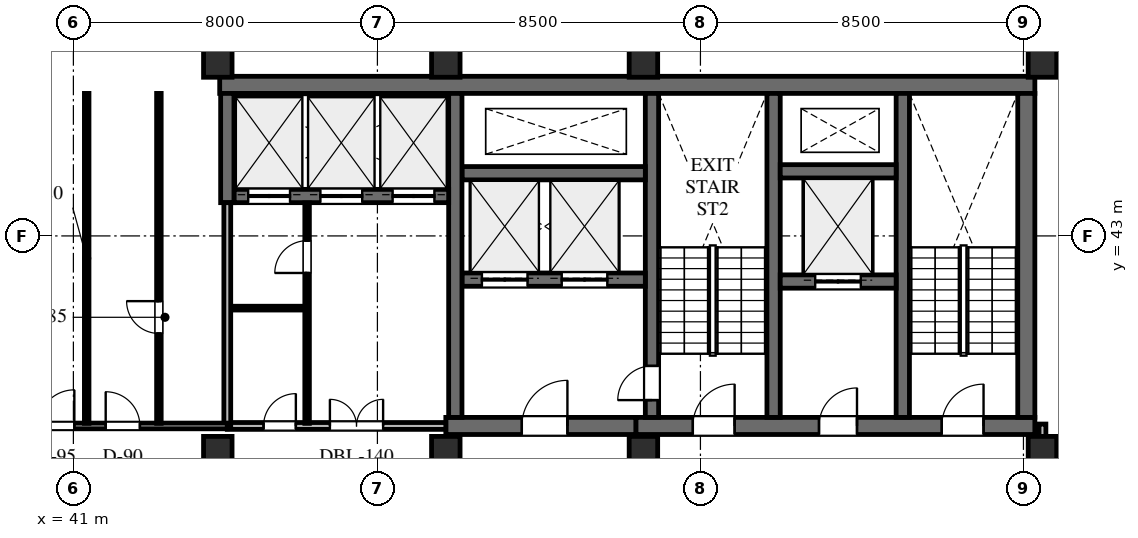
"""IFC4 building model, lengths in metres.
Left out: names, types, materials, properties, quantities, classifications, styles, units other than length and angle.
Written with IfcOpenShell. Run it as: python <this file> out.ifc"""

import sys

from ifc_helpers import new_model, si_unit, direction, frame, frame_2d, origin, origin_2d, place, context, subcontext, project, spatial, rectangle, extrude, element, fill, save


model = new_model("IFC4")
c1 = context("Model", 3, precision=1e-05, world=origin(), true_north=direction((0.0, 1.0)))
c2 = subcontext(c1, "Body", "Model", "MODEL_VIEW")
j1 = project(units=[si_unit("LENGTHUNIT", "METRE"), si_unit("PLANEANGLEUNIT", "RADIAN")], contexts=[c1])
p1 = place(None, origin())
s1 = spatial("IfcSite", under=j1, at=p1, CompositionType="ELEMENT")
p2 = place(p1, origin())
s2 = spatial("IfcBuilding", under=s1, at=p2, CompositionType="ELEMENT")
p3 = place(p2, frame((0.0, 0.0, 303.9)))
s3 = spatial("IfcBuildingStorey", under=s2, at=p3, CompositionType="ELEMENT", Elevation=303.9)
p4 = place(p3, frame((44.85, 46.975, 0.0), z_axis=(0.0, 0.0, 1.0), x_axis=(1.0, 0.0, 0.0)))
e1 = element("IfcWall", 1, at=p4, inside=s3, PredefinedType="SHEAR", context=c2, shape_type="SweptSolid", body=[
    extrude(rectangle(XDim=21.45, YDim=0.45, at=frame_2d((10.725, 0.0))), origin(), (0.0, 0.0, 1.0), 3.6),
])
p5 = place(p3, frame((55.8, 38.0, 0.0), z_axis=(0.0, 0.0, 1.0), x_axis=(1.0, 0.0, 0.0)))
e2 = element("IfcWall", 2, at=p5, inside=s3, PredefinedType="SHEAR", context=c2, shape_type="SweptSolid", body=[
    extrude(rectangle(XDim=10.5, YDim=0.45, at=frame_2d((5.25, 0.0))), origin(), (0.0, 0.0, 1.0), 3.6),
])
p6 = place(p5, frame((1.5, 0.0, 0.0)))
e3 = element("IfcOpeningElement", 3, at=p6, cuts=e2, PredefinedType="OPENING", context=c2, shape_type="SweptSolid", body=[
    extrude(rectangle(XDim=1.1, YDim=2.2, at=frame_2d((0.55, 1.1))), frame((0.0, 0.235, 0.0), z_axis=(0.0, -1.0, 0.0), x_axis=(1.0, 0.0, 0.0)), (0.0, 0.0, 1.0), 0.47),
])
p7 = place(p5, frame((4.82, 0.0, 0.0)))
e4 = element("IfcOpeningElement", 4, at=p7, cuts=e2, PredefinedType="OPENING", context=c2, shape_type="SweptSolid", body=[
    extrude(rectangle(XDim=1.0, YDim=2.15, at=frame_2d((0.5, 1.075))), frame((0.0, 0.235, 0.0), z_axis=(0.0, -1.0, 0.0), x_axis=(1.0, 0.0, 0.0)), (0.0, 0.0, 1.0), 0.47),
])
p8 = place(p5, frame((8.05, 0.0, 0.0)))
e5 = element("IfcOpeningElement", 5, at=p8, cuts=e2, PredefinedType="OPENING", context=c2, shape_type="SweptSolid", body=[
    extrude(rectangle(XDim=1.1, YDim=2.2, at=frame_2d((0.55, 1.1))), frame((0.0, 0.235, 0.0), z_axis=(0.0, -1.0, 0.0), x_axis=(1.0, 0.0, 0.0)), (0.0, 0.0, 1.0), 0.47),
])
p9 = place(p3, frame((66.075, 38.225, 0.0), z_axis=(0.0, 0.0, 1.0), x_axis=(0.0, 1.0, 0.0)))
e6 = element("IfcWall", 6, at=p9, inside=s3, PredefinedType="SHEAR", context=c2, shape_type="SweptSolid", body=[
    extrude(rectangle(XDim=8.525, YDim=0.45, at=frame_2d((4.262, 0.0))), origin(), (0.0, 0.0, 1.0), 3.6),
])
for number, where, z_axis, x_axis in (
    (7, (62.825, 38.225, 0.0), (0.0, 0.0, 1.0), (0.0, 1.0, 0.0)),
    (8, (59.425, 38.225, 0.0), (0.0, 0.0, 1.0), (0.0, 1.0, 0.0)),
):
    element("IfcWall", number, at=place(p3, frame(where, z_axis=z_axis, x_axis=x_axis)), inside=s3, PredefinedType="SHEAR", context=c2, shape_type="SweptSolid", body=[
        extrude(rectangle(XDim=8.525, YDim=0.35, at=frame_2d((4.262, 0.0))), origin(), (0.0, 0.0, 1.0), 3.6),
    ])
p10 = place(p3, frame((56.225, 38.225, 0.0), z_axis=(0.0, 0.0, 1.0), x_axis=(0.0, 1.0, 0.0)))
e9 = element("IfcWall", 9, at=p10, inside=s3, PredefinedType="SHEAR", context=c2, shape_type="SweptSolid", body=[
    extrude(rectangle(XDim=8.525, YDim=0.35, at=frame_2d((4.262, 0.0))), origin(), (0.0, 0.0, 1.0), 3.6),
])
p11 = place(p10, frame((0.455, 0.0, 0.0)))
e10 = element("IfcOpeningElement", 10, at=p11, cuts=e9, PredefinedType="OPENING", context=c2, shape_type="SweptSolid", body=[
    extrude(rectangle(XDim=0.9, YDim=2.15, at=frame_2d((0.45, 1.075))), frame((0.0, 0.185, 0.0), z_axis=(0.0, -1.0, 0.0), x_axis=(1.0, 0.0, 0.0)), (0.0, 0.0, 1.0), 0.37),
])
p12 = place(p3, frame((59.6, 41.8, 0.0), z_axis=(0.0, 0.0, 1.0), x_axis=(1.0, 0.0, 0.0)))
e11 = element("IfcWall", 11, at=p12, inside=s3, PredefinedType="SHEAR", context=c2, shape_type="SweptSolid", body=[
    extrude(rectangle(XDim=3.05, YDim=0.35, at=frame_2d((1.525, 0.0))), origin(), (0.0, 0.0, 1.0), 3.6),
])
p13 = place(p12, frame((0.92, 0.0, 0.0)))
e12 = element("IfcOpeningElement", 12, at=p13, cuts=e11, PredefinedType="OPENING", context=c2, shape_type="SweptSolid", body=[
    extrude(rectangle(XDim=1.2, YDim=2.2, at=frame_2d((0.6, 1.1))), frame((0.0, 0.185, 0.0), z_axis=(0.0, -1.0, 0.0), x_axis=(1.0, 0.0, 0.0)), (0.0, 0.0, 1.0), 0.37),
])
p14 = place(p3, frame((59.6, 44.7, 0.0), z_axis=(0.0, 0.0, 1.0), x_axis=(1.0, 0.0, 0.0)))
e13 = element("IfcWall", 13, at=p14, inside=s3, PredefinedType="SHEAR", context=c2, shape_type="SweptSolid", body=[
    extrude(rectangle(XDim=3.05, YDim=0.35, at=frame_2d((1.525, 0.0))), origin(), (0.0, 0.0, 1.0), 3.6),
])
p15 = place(p3, frame((50.8, 38.0, 0.0), z_axis=(0.0, 0.0, 1.0), x_axis=(1.0, 0.0, 0.0)))
e14 = element("IfcWall", 14, at=p15, inside=s3, PredefinedType="SHEAR", context=c2, shape_type="SweptSolid", body=[
    extrude(rectangle(XDim=5.0, YDim=0.45, at=frame_2d((2.5, 0.0))), origin(), (0.0, 0.0, 1.0), 3.6),
])
p16 = place(p15, frame((2.0, 0.0, 0.0)))
e15 = element("IfcOpeningElement", 15, at=p16, cuts=e14, PredefinedType="OPENING", context=c2, shape_type="SweptSolid", body=[
    extrude(rectangle(XDim=1.2, YDim=2.2, at=frame_2d((0.6, 1.1))), frame((0.0, 0.235, 0.0), z_axis=(0.0, -1.0, 0.0), x_axis=(1.0, 0.0, 0.0)), (0.0, 0.0, 1.0), 0.47),
])
p17 = place(p3, frame((51.225, 41.85, 0.0), z_axis=(0.0, 0.0, 1.0), x_axis=(1.0, 0.0, 0.0)))
e16 = element("IfcWall", 16, at=p17, inside=s3, PredefinedType="SHEAR", context=c2, shape_type="SweptSolid", body=[
    extrude(rectangle(XDim=4.825, YDim=0.35, at=frame_2d((2.413, 0.0))), origin(), (0.0, 0.0, 1.0), 3.6),
])
p18 = place(p17, frame((0.525, 0.0, 0.0)))
e17 = element("IfcOpeningElement", 17, at=p18, cuts=e16, PredefinedType="OPENING", context=c2, shape_type="SweptSolid", body=[
    extrude(rectangle(XDim=1.2, YDim=2.2, at=frame_2d((0.6, 1.1))), frame((0.0, 0.185, 0.0), z_axis=(0.0, -1.0, 0.0), x_axis=(1.0, 0.0, 0.0)), (0.0, 0.0, 1.0), 0.37),
])
p19 = place(p17, frame((2.625, 0.0, 0.0)))
e18 = element("IfcOpeningElement", 18, at=p19, cuts=e16, PredefinedType="OPENING", context=c2, shape_type="SweptSolid", body=[
    extrude(rectangle(XDim=1.2, YDim=2.2, at=frame_2d((0.6, 1.1))), frame((0.0, 0.185, 0.0), z_axis=(0.0, -1.0, 0.0), x_axis=(1.0, 0.0, 0.0)), (0.0, 0.0, 1.0), 0.37),
])
p20 = place(p3, frame((51.225, 44.65, 0.0), z_axis=(0.0, 0.0, 1.0), x_axis=(1.0, 0.0, 0.0)))
e19 = element("IfcWall", 19, at=p20, inside=s3, PredefinedType="SHEAR", context=c2, shape_type="SweptSolid", body=[
    extrude(rectangle(XDim=4.825, YDim=0.35, at=frame_2d((2.413, 0.0))), origin(), (0.0, 0.0, 1.0), 3.6),
])
p21 = place(p3, frame((51.05, 38.225, 0.0), z_axis=(0.0, 0.0, 1.0), x_axis=(0.0, 1.0, 0.0)))
e20 = element("IfcWall", 20, at=p21, inside=s3, PredefinedType="SHEAR", context=c2, shape_type="SweptSolid", body=[
    extrude(rectangle(XDim=8.525, YDim=0.35, at=frame_2d((4.262, 0.0))), origin(), (0.0, 0.0, 1.0), 3.6),
])
p22 = place(p3, frame((45.225, 44.05, 0.0), z_axis=(0.0, 0.0, 1.0), x_axis=(1.0, 0.0, 0.0)))
e21 = element("IfcWall", 21, at=p22, inside=s3, PredefinedType="SHEAR", context=c2, shape_type="SweptSolid", body=[
    extrude(rectangle(XDim=5.65, YDim=0.35, at=frame_2d((2.825, 0.0))), origin(), (0.0, 0.0, 1.0), 3.6),
])
p23 = place(p22, frame((0.375, 0.0, 0.0)))
e22 = element("IfcOpeningElement", 22, at=p23, cuts=e21, PredefinedType="OPENING", context=c2, shape_type="SweptSolid", body=[
    extrude(rectangle(XDim=1.1, YDim=2.2, at=frame_2d((0.55, 1.1))), frame((0.0, 0.185, 0.0), z_axis=(0.0, -1.0, 0.0), x_axis=(1.0, 0.0, 0.0)), (0.0, 0.0, 1.0), 0.37),
])
p24 = place(p22, frame((2.275, 0.0, 0.0)))
e23 = element("IfcOpeningElement", 23, at=p24, cuts=e21, PredefinedType="OPENING", context=c2, shape_type="SweptSolid", body=[
    extrude(rectangle(XDim=1.1, YDim=2.2, at=frame_2d((0.55, 1.1))), frame((0.0, 0.185, 0.0), z_axis=(0.0, -1.0, 0.0), x_axis=(1.0, 0.0, 0.0)), (0.0, 0.0, 1.0), 0.37),
])
p25 = place(p22, frame((4.175, 0.0, 0.0)))
e24 = element("IfcOpeningElement", 24, at=p25, cuts=e21, PredefinedType="OPENING", context=c2, shape_type="SweptSolid", body=[
    extrude(rectangle(XDim=1.1, YDim=2.2, at=frame_2d((0.55, 1.1))), frame((0.0, 0.185, 0.0), z_axis=(0.0, -1.0, 0.0), x_axis=(1.0, 0.0, 0.0)), (0.0, 0.0, 1.0), 0.37),
])
p26 = place(p3, frame((45.05, 43.875, 0.0), z_axis=(0.0, 0.0, 1.0), x_axis=(0.0, 1.0, 0.0)))
e25 = element("IfcWall", 25, at=p26, inside=s3, PredefinedType="SHEAR", context=c2, shape_type="SweptSolid", body=[
    extrude(rectangle(XDim=2.875, YDim=0.35, at=frame_2d((1.438, 0.0))), origin(), (0.0, 0.0, 1.0), 3.6),
])
for number, where, z_axis, x_axis in (
    (26, (66.5, 47.55, 0.0), (0.0, 0.0, 1.0), (1.0, 0.0, 0.0)),
    (27, (56.0, 47.55, 0.0), (0.0, 0.0, 1.0), (1.0, 0.0, 0.0)),
    (28, (66.5, 37.35, 0.0), (0.0, 0.0, 1.0), (1.0, 0.0, 0.0)),
    (29, (56.0, 37.35, 0.0), (0.0, 0.0, 1.0), (1.0, 0.0, 0.0)),
    (30, (50.8, 47.55, 0.0), (0.0, 0.0, 1.0), (1.0, 0.0, 0.0)),
    (31, (50.8, 37.35, 0.0), (0.0, 0.0, 1.0), (1.0, 0.0, 0.0)),
    (32, (44.8, 37.35, 0.0), (0.0, 0.0, 1.0), (1.0, 0.0, 0.0)),
    (33, (44.8, 47.55, 0.0), (0.0, 0.0, 1.0), (1.0, 0.0, 0.0)),
):
    element("IfcColumn", number, at=place(p3, frame(where, z_axis=z_axis, x_axis=x_axis)), inside=s3, PredefinedType="COLUMN", context=c2, shape_type="SweptSolid", body=[
        extrude(rectangle(XDim=0.75, YDim=0.75, at=origin_2d()), origin(), (0.0, 0.0, 1.0), 3.6),
    ])
p27 = place(p3, frame((68.375, 37.8, 0.0), z_axis=(0.0, 0.0, 1.0), x_axis=(-0.139177573889, -0.990267440102, 0.0)))
e34 = element("IfcWall", 34, at=p27, inside=s3, PredefinedType="STANDARD", context=c2, shape_type="SweptSolid", body=[
    extrude(rectangle(XDim=16.317, YDim=0.28, at=frame_2d((8.159, 0.0))), origin(), (0.0, 0.0, 1.0), 3.365),
])
p28 = place(p27, frame((8.319, 0.0, 0.0)))
e35 = element("IfcOpeningElement", 35, at=p28, cuts=e34, PredefinedType="OPENING", context=c2, shape_type="SweptSolid", body=[
    extrude(rectangle(XDim=1.0, YDim=2.15, at=frame_2d((0.5, 1.075))), frame((0.0, 0.15, 0.0), z_axis=(0.0, -1.0, 0.0), x_axis=(1.0, 0.0, 0.0)), (0.0, 0.0, 1.0), 0.3),
])
p29 = place(p27, frame((3.754, 0.0, 0.65)))
e36 = element("IfcOpeningElement", 36, at=p29, cuts=e34, PredefinedType="OPENING", context=c2, shape_type="SweptSolid", body=[
    extrude(rectangle(XDim=1.8, YDim=2.1, at=frame_2d((0.9, 1.05))), frame((0.0, 0.15, 0.0), z_axis=(0.0, -1.0, 0.0), x_axis=(1.0, 0.0, 0.0)), (0.0, 0.0, 1.0), 0.3),
])
p30 = place(p27, frame((11.85, 0.0, 0.65)))
e37 = element("IfcOpeningElement", 37, at=p30, cuts=e34, PredefinedType="OPENING", context=c2, shape_type="SweptSolid", body=[
    extrude(rectangle(XDim=1.8, YDim=2.1, at=frame_2d((0.9, 1.05))), frame((0.0, 0.15, 0.0), z_axis=(0.0, -1.0, 0.0), x_axis=(1.0, 0.0, 0.0)), (0.0, 0.0, 1.0), 0.3),
])
p31 = place(p3, frame((45.05, 38.0, 0.0), z_axis=(0.0, 0.0, 1.0), x_axis=(1.0, 0.0, 0.0)))
e38 = element("IfcWall", 38, at=p31, inside=s3, PredefinedType="STANDARD", context=c2, shape_type="SweptSolid", body=[
    extrude(rectangle(XDim=5.75, YDim=0.18, at=frame_2d((2.875, 0.0))), origin(), (0.0, 0.0, 1.0), 2.754),
])
p32 = place(p31, frame((0.954, 0.0, 0.0)))
e39 = element("IfcOpeningElement", 39, at=p32, cuts=e38, PredefinedType="OPENING", context=c2, shape_type="SweptSolid", body=[
    extrude(rectangle(XDim=0.85, YDim=2.1, at=frame_2d((0.425, 1.05))), frame((0.0, 0.1, 0.0), z_axis=(0.0, -1.0, 0.0), x_axis=(1.0, 0.0, 0.0)), (0.0, 0.0, 1.0), 0.2),
])
p33 = place(p31, frame((2.7, 0.0, 0.0)))
e40 = element("IfcOpeningElement", 40, at=p33, cuts=e38, PredefinedType="OPENING", context=c2, shape_type="SweptSolid", body=[
    extrude(rectangle(XDim=1.4, YDim=2.2, at=frame_2d((0.7, 1.1))), frame((0.0, 0.1, 0.0), z_axis=(0.0, -1.0, 0.0), x_axis=(1.0, 0.0, 0.0)), (0.0, 0.0, 1.0), 0.2),
])
p34 = place(p3, frame((47.15, 38.068, 0.0), z_axis=(0.0, 0.0, 1.0), x_axis=(0.0, 1.0, 0.0)))
e41 = element("IfcWall", 41, at=p34, inside=s3, PredefinedType="PARTITIONING", context=c2, shape_type="SweptSolid", body=[
    extrude(rectangle(XDim=5.799, YDim=0.12, at=frame_2d((2.899, 0.0))), origin(), (0.0, 0.0, 1.0), 3.365),
])
p35 = place(p34, frame((3.957, 0.0, 0.0)))
e42 = element("IfcOpeningElement", 42, at=p35, cuts=e41, PredefinedType="OPENING", context=c2, shape_type="SweptSolid", body=[
    extrude(rectangle(XDim=0.85, YDim=2.1, at=frame_2d((0.425, 1.05))), frame((0.0, 0.07, 0.0), z_axis=(0.0, -1.0, 0.0), x_axis=(1.0, 0.0, 0.0)), (0.0, 0.0, 1.0), 0.14),
])
p36 = place(p3, frame((45.118, 41.1, 0.0), z_axis=(0.0, 0.0, 1.0), x_axis=(1.0, 0.0, 0.0)))
e43 = element("IfcWall", 43, at=p36, inside=s3, PredefinedType="PARTITIONING", context=c2, shape_type="SweptSolid", body=[
    extrude(rectangle(XDim=1.964, YDim=0.1, at=frame_2d((0.982, 0.0))), origin(), (0.0, 0.0, 1.0), 3.365),
])
p37 = place(p3, frame((45.05, 38.0, 0.0), z_axis=(0.0, 0.0, 1.0), x_axis=(0.0, 1.0, 0.0)))
e44 = element("IfcWall", 44, at=p37, inside=s3, PredefinedType="STANDARD", context=c2, shape_type="SweptSolid", body=[
    extrude(rectangle(XDim=5.875, YDim=0.18, at=frame_2d((2.938, 0.0))), origin(), (0.0, 0.0, 1.0), 2.754),
])
p38 = place(p3, frame((34.285, 38.0, 0.0), z_axis=(0.0, 0.0, 1.0), x_axis=(1.0, 0.0, 0.0)))
e45 = element("IfcWall", 45, at=p38, inside=s3, PredefinedType="PARTITIONING", context=c2, shape_type="SweptSolid", body=[
    extrude(rectangle(XDim=10.765, YDim=0.15, at=frame_2d((5.383, 0.0))), origin(), (0.0, 0.0, 1.0), 2.754),
])
p39 = place(p38, frame((5.79, 0.0, 0.0)))
e46 = element("IfcOpeningElement", 46, at=p39, cuts=e45, PredefinedType="OPENING", context=c2, shape_type="SweptSolid", body=[
    extrude(rectangle(XDim=0.95, YDim=2.15, at=frame_2d((0.475, 1.075))), frame((0.0, 0.085, 0.0), z_axis=(0.0, -1.0, 0.0), x_axis=(1.0, 0.0, 0.0)), (0.0, 0.0, 1.0), 0.17),
])
p40 = place(p38, frame((7.565, 0.0, 0.0)))
e47 = element("IfcOpeningElement", 47, at=p40, cuts=e45, PredefinedType="OPENING", context=c2, shape_type="SweptSolid", body=[
    extrude(rectangle(XDim=0.9, YDim=2.1, at=frame_2d((0.45, 1.05))), frame((0.0, 0.085, 0.0), z_axis=(0.0, -1.0, 0.0), x_axis=(1.0, 0.0, 0.0)), (0.0, 0.0, 1.0), 0.17),
])
p41 = place(p3, frame((41.35, 38.068, 0.0), z_axis=(0.0, 0.0, 1.0), x_axis=(0.0, 1.0, 0.0)))
e48 = element("IfcWall", 48, at=p41, inside=s3, PredefinedType="PARTITIONING", context=c2, shape_type="SweptSolid", body=[
    extrude(rectangle(XDim=8.682, YDim=0.12, at=frame_2d((4.341, 0.0))), origin(), (0.0, 0.0, 1.0), 3.365),
])
p42 = place(p3, frame((43.25, 38.068, 0.0), z_axis=(0.0, 0.0, 1.0), x_axis=(0.0, 1.0, 0.0)))
e49 = element("IfcWall", 49, at=p42, inside=s3, PredefinedType="PARTITIONING", context=c2, shape_type="SweptSolid", body=[
    extrude(rectangle(XDim=8.682, YDim=0.12, at=frame_2d((4.341, 0.0))), origin(), (0.0, 0.0, 1.0), 3.365),
])
p43 = place(p42, frame((2.366, 0.0, 0.0)))
e50 = element("IfcOpeningElement", 50, at=p43, cuts=e49, PredefinedType="OPENING", context=c2, shape_type="SweptSolid", body=[
    extrude(rectangle(XDim=0.85, YDim=2.1, at=frame_2d((0.425, 1.05))), frame((0.0, 0.07, 0.0), z_axis=(0.0, -1.0, 0.0), x_axis=(1.0, 0.0, 0.0)), (0.0, 0.0, 1.0), 0.14),
])
p44 = place(p3, frame((66.5, 35.468, 0.0), z_axis=(0.0, 0.0, 1.0), x_axis=(0.0, 1.0, 0.0)))
e51 = element("IfcWall", 51, at=p44, inside=s3, PredefinedType="STANDARD", context=c2, shape_type="SweptSolid", body=[
    extrude(rectangle(XDim=2.582, YDim=0.18, at=frame_2d((1.291, 0.0))), origin(), (0.0, 0.0, 1.0), 2.754),
])
p45 = place(p6, origin())
e52 = element("IfcDoor", 52, at=p45, inside=s3, OperationType="SINGLE_SWING_RIGHT", PredefinedType="DOOR", context=c2, shape_type="SweptSolid", body=[
    extrude(rectangle(XDim=1.1, YDim=2.2, at=frame_2d((0.55, 1.1))), frame((0.0, 0.025, 0.0), z_axis=(0.0, -1.0, 0.0), x_axis=(1.0, 0.0, 0.0)), (0.0, 0.0, 1.0), 0.05),
])
fill(e3, e52)
p46 = place(p7, origin())
e53 = element("IfcDoor", 53, at=p46, inside=s3, OperationType="SINGLE_SWING_RIGHT", PredefinedType="DOOR", context=c2, shape_type="SweptSolid", body=[
    extrude(rectangle(XDim=1.0, YDim=2.15, at=frame_2d((0.5, 1.075))), frame((0.0, 0.025, 0.0), z_axis=(0.0, -1.0, 0.0), x_axis=(1.0, 0.0, 0.0)), (0.0, 0.0, 1.0), 0.05),
])
fill(e4, e53)
p47 = place(p8, origin())
e54 = element("IfcDoor", 54, at=p47, inside=s3, OperationType="SINGLE_SWING_RIGHT", PredefinedType="DOOR", context=c2, shape_type="SweptSolid", body=[
    extrude(rectangle(XDim=1.1, YDim=2.2, at=frame_2d((0.55, 1.1))), frame((0.0, 0.025, 0.0), z_axis=(0.0, -1.0, 0.0), x_axis=(1.0, 0.0, 0.0)), (0.0, 0.0, 1.0), 0.05),
])
fill(e5, e54)
p48 = place(p16, origin())
e55 = element("IfcDoor", 55, at=p48, inside=s3, OperationType="SINGLE_SWING_RIGHT", PredefinedType="DOOR", context=c2, shape_type="SweptSolid", body=[
    extrude(rectangle(XDim=1.2, YDim=2.2, at=frame_2d((0.6, 1.1))), frame((0.0, 0.025, 0.0), z_axis=(0.0, -1.0, 0.0), x_axis=(1.0, 0.0, 0.0)), (0.0, 0.0, 1.0), 0.05),
])
fill(e15, e55)
p49 = place(p11, origin())
e56 = element("IfcDoor", 56, at=p49, inside=s3, OperationType="SINGLE_SWING_LEFT", PredefinedType="DOOR", context=c2, shape_type="SweptSolid", body=[
    extrude(rectangle(XDim=0.9, YDim=2.15, at=frame_2d((0.45, 1.075))), frame((0.0, 0.025, 0.0), z_axis=(0.0, -1.0, 0.0), x_axis=(1.0, 0.0, 0.0)), (0.0, 0.0, 1.0), 0.05),
])
fill(e10, e56)
p50 = place(p23, origin())
e57 = element("IfcDoor", 57, at=p50, inside=s3, OperationType="DOUBLE_DOOR_SLIDING", PredefinedType="DOOR", context=c2, shape_type="SweptSolid", body=[
    extrude(rectangle(XDim=1.1, YDim=2.2, at=frame_2d((0.55, 1.1))), frame((0.0, 0.025, 0.0), z_axis=(0.0, -1.0, 0.0), x_axis=(1.0, 0.0, 0.0)), (0.0, 0.0, 1.0), 0.05),
])
fill(e22, e57)
p51 = place(p24, origin())
e58 = element("IfcDoor", 58, at=p51, inside=s3, OperationType="DOUBLE_DOOR_SLIDING", PredefinedType="DOOR", context=c2, shape_type="SweptSolid", body=[
    extrude(rectangle(XDim=1.1, YDim=2.2, at=frame_2d((0.55, 1.1))), frame((0.0, 0.025, 0.0), z_axis=(0.0, -1.0, 0.0), x_axis=(1.0, 0.0, 0.0)), (0.0, 0.0, 1.0), 0.05),
])
fill(e23, e58)
p52 = place(p25, origin())
e59 = element("IfcDoor", 59, at=p52, inside=s3, OperationType="DOUBLE_DOOR_SLIDING", PredefinedType="DOOR", context=c2, shape_type="SweptSolid", body=[
    extrude(rectangle(XDim=1.1, YDim=2.2, at=frame_2d((0.55, 1.1))), frame((0.0, 0.025, 0.0), z_axis=(0.0, -1.0, 0.0), x_axis=(1.0, 0.0, 0.0)), (0.0, 0.0, 1.0), 0.05),
])
fill(e24, e59)
p53 = place(p18, origin())
e60 = element("IfcDoor", 60, at=p53, inside=s3, OperationType="DOUBLE_DOOR_SLIDING", PredefinedType="DOOR", context=c2, shape_type="SweptSolid", body=[
    extrude(rectangle(XDim=1.2, YDim=2.2, at=frame_2d((0.6, 1.1))), frame((0.0, 0.025, 0.0), z_axis=(0.0, -1.0, 0.0), x_axis=(1.0, 0.0, 0.0)), (0.0, 0.0, 1.0), 0.05),
])
fill(e17, e60)
p54 = place(p19, origin())
e61 = element("IfcDoor", 61, at=p54, inside=s3, OperationType="DOUBLE_DOOR_SLIDING", PredefinedType="DOOR", context=c2, shape_type="SweptSolid", body=[
    extrude(rectangle(XDim=1.2, YDim=2.2, at=frame_2d((0.6, 1.1))), frame((0.0, 0.025, 0.0), z_axis=(0.0, -1.0, 0.0), x_axis=(1.0, 0.0, 0.0)), (0.0, 0.0, 1.0), 0.05),
])
fill(e18, e61)
p55 = place(p13, origin())
e62 = element("IfcDoor", 62, at=p55, inside=s3, OperationType="DOUBLE_DOOR_SLIDING", PredefinedType="DOOR", context=c2, shape_type="SweptSolid", body=[
    extrude(rectangle(XDim=1.2, YDim=2.2, at=frame_2d((0.6, 1.1))), frame((0.0, 0.025, 0.0), z_axis=(0.0, -1.0, 0.0), x_axis=(1.0, 0.0, 0.0)), (0.0, 0.0, 1.0), 0.05),
])
fill(e12, e62)
p56 = place(p32, origin())
e63 = element("IfcDoor", 63, at=p56, inside=s3, OperationType="SINGLE_SWING_RIGHT", PredefinedType="DOOR", context=c2, shape_type="SweptSolid", body=[
    extrude(rectangle(XDim=0.85, YDim=2.1, at=frame_2d((0.425, 1.05))), frame((0.0, 0.025, 0.0), z_axis=(0.0, -1.0, 0.0), x_axis=(1.0, 0.0, 0.0)), (0.0, 0.0, 1.0), 0.05),
])
fill(e39, e63)
p57 = place(p35, origin())
e64 = element("IfcDoor", 64, at=p57, inside=s3, OperationType="SINGLE_SWING_LEFT", PredefinedType="DOOR", context=c2, shape_type="SweptSolid", body=[
    extrude(rectangle(XDim=0.85, YDim=2.1, at=frame_2d((0.425, 1.05))), frame((0.0, 0.025, 0.0), z_axis=(0.0, -1.0, 0.0), x_axis=(1.0, 0.0, 0.0)), (0.0, 0.0, 1.0), 0.05),
])
fill(e42, e64)
p58 = place(p33, origin())
e65 = element("IfcDoor", 65, at=p58, inside=s3, OperationType="DOUBLE_DOOR_SINGLE_SWING", PredefinedType="DOOR", context=c2, shape_type="SweptSolid", body=[
    extrude(rectangle(XDim=1.4, YDim=2.2, at=frame_2d((0.7, 1.1))), frame((0.0, 0.025, 0.0), z_axis=(0.0, -1.0, 0.0), x_axis=(1.0, 0.0, 0.0)), (0.0, 0.0, 1.0), 0.05),
])
fill(e40, e65)
p59 = place(p39, origin())
e66 = element("IfcDoor", 66, at=p59, inside=s3, OperationType="SINGLE_SWING_RIGHT", PredefinedType="DOOR", context=c2, shape_type="SweptSolid", body=[
    extrude(rectangle(XDim=0.95, YDim=2.15, at=frame_2d((0.475, 1.075))), frame((0.0, 0.025, 0.0), z_axis=(0.0, -1.0, 0.0), x_axis=(1.0, 0.0, 0.0)), (0.0, 0.0, 1.0), 0.05),
])
fill(e46, e66)
p60 = place(p40, origin())
e67 = element("IfcDoor", 67, at=p60, inside=s3, OperationType="SINGLE_SWING_LEFT", PredefinedType="DOOR", context=c2, shape_type="SweptSolid", body=[
    extrude(rectangle(XDim=0.9, YDim=2.1, at=frame_2d((0.45, 1.05))), frame((0.0, 0.025, 0.0), z_axis=(0.0, -1.0, 0.0), x_axis=(1.0, 0.0, 0.0)), (0.0, 0.0, 1.0), 0.05),
])
fill(e47, e67)
p61 = place(p43, origin())
e68 = element("IfcDoor", 68, at=p61, inside=s3, OperationType="SINGLE_SWING_RIGHT", PredefinedType="DOOR", context=c2, shape_type="SweptSolid", body=[
    extrude(rectangle(XDim=0.85, YDim=2.1, at=frame_2d((0.425, 1.05))), frame((0.0, 0.025, 0.0), z_axis=(0.0, -1.0, 0.0), x_axis=(1.0, 0.0, 0.0)), (0.0, 0.0, 1.0), 0.05),
])
fill(e50, e68)
save(model, sys.argv[1])
